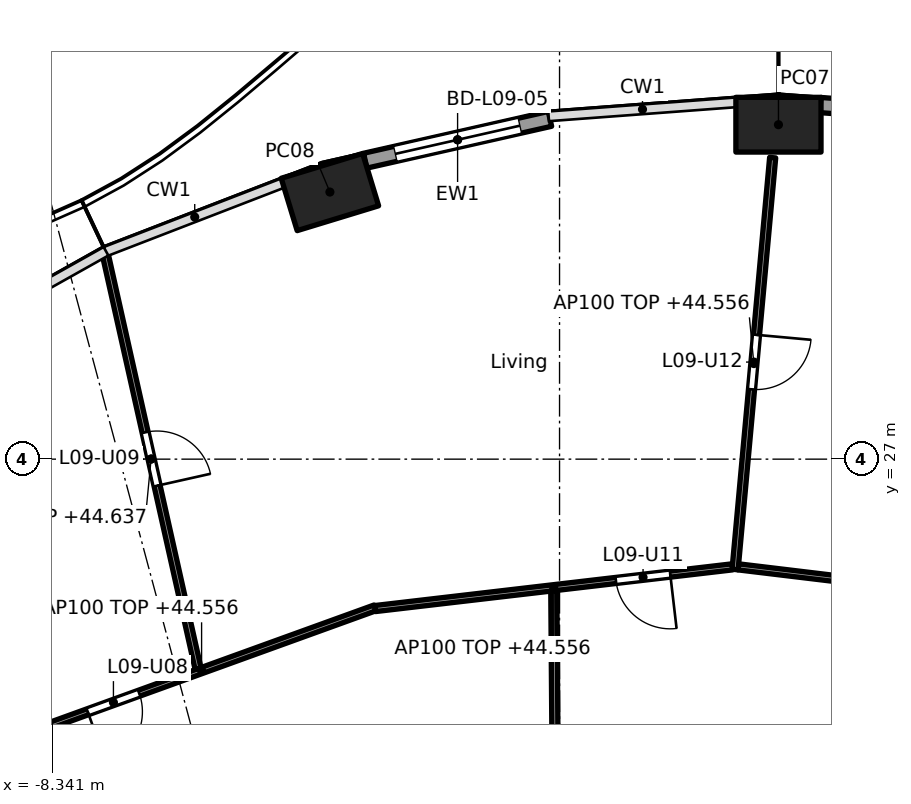
"""IFC4 building model, lengths in metres.
Left out: names, types, materials, properties, quantities, classifications, styles, units other than length and angle.
Written with IfcOpenShell. Run it as: python <this file> out.ifc"""

import sys

from ifc_helpers import new_model, si_unit, direction, frame, frame_2d, origin, origin_2d, place, context, subcontext, project, spatial, rectangle, hollow_rectangle, extrude, element, fill, save


model = new_model("IFC4")
c1 = context("Model", 3, precision=1e-05, world=origin(), true_north=direction((0.0, 1.0)))
c2 = subcontext(c1, "Body", "Model", "MODEL_VIEW")
j1 = project(units=[si_unit("LENGTHUNIT", "METRE"), si_unit("PLANEANGLEUNIT", "RADIAN")], contexts=[c1])
p1 = place(None, origin())
s1 = spatial("IfcSite", under=j1, at=p1, CompositionType="ELEMENT")
p2 = place(p1, origin())
s2 = spatial("IfcBuilding", under=s1, at=p2, CompositionType="ELEMENT")
p3 = place(p2, frame((0.0, 0.0, 41.8)))
s3 = spatial("IfcBuildingStorey", under=s2, at=p3, CompositionType="ELEMENT", Elevation=41.8)
for number, where, z_axis, x_axis in (
    (1, (3.6, 32.5, 0.0), (0.0, 0.0, 1.0), (-1.0, 0.0, 0.0)),
    (2, (-3.776, 31.393, 0.0), (0.0, 0.0, 1.0), (-0.957, -0.292, 0.0)),
):
    element("IfcColumn", number, at=place(p3, frame(where, z_axis=z_axis, x_axis=x_axis)), inside=s3, PredefinedType="COLUMN", context=c2, shape_type="SweptSolid", body=[
        extrude(hollow_rectangle(XDim=1.4, YDim=0.9, WallThickness=0.05, at=origin_2d()), origin(), (0.0, 0.0, 1.0), 3.7),
    ])
p4 = place(p3, frame((4.289, 32.823, 0.0), z_axis=(0.0, 0.0, 1.0), x_axis=(0.997230834878, -0.074368420505, 0.0)))
e3 = element("IfcWall", 3, at=p4, inside=s3, PredefinedType="SOLIDWALL", context=c2, shape_type="SweptSolid", body=[
    extrude(rectangle(XDim=3.096, YDim=0.25, at=frame_2d((1.548, 0.0))), origin(), (0.0, 0.0, 1.0), 3.44),
])
p5 = place(p4, frame((0.498, 0.0, 0.0)))
e4 = element("IfcOpeningElement", 4, at=p5, cuts=e3, PredefinedType="OPENING", context=c2, shape_type="SweptSolid", body=[
    extrude(rectangle(XDim=2.1, YDim=2.4, at=frame_2d((1.05, 1.2))), frame((0.0, 0.135, 0.0), z_axis=(0.0, -1.0, 0.0), x_axis=(1.0, 0.0, 0.0)), (0.0, 0.0, 1.0), 0.27),
])
p6 = place(p3, frame((-3.195, 31.908, 0.0), z_axis=(0.0, 0.0, 1.0), x_axis=(0.975331134677, 0.220746863466, 0.0)))
e5 = element("IfcWall", 5, at=p6, inside=s3, PredefinedType="SOLIDWALL", context=c2, shape_type="SweptSolid", body=[
    extrude(rectangle(XDim=3.115, YDim=0.25, at=frame_2d((1.557, 0.0))), origin(), (0.0, 0.0, 1.0), 3.44),
])
p7 = place(p6, frame((0.507, 0.0, 0.0)))
e6 = element("IfcOpeningElement", 6, at=p7, cuts=e5, PredefinedType="OPENING", context=c2, shape_type="SweptSolid", body=[
    extrude(rectangle(XDim=2.1, YDim=2.4, at=frame_2d((1.05, 1.2))), frame((0.0, 0.135, 0.0), z_axis=(0.0, -1.0, 0.0), x_axis=(1.0, 0.0, 0.0)), (0.0, 0.0, 1.0), 0.27),
])
p8 = place(p3, frame((8.907, 24.51, 0.0), z_axis=(0.0, 0.0, 1.0), x_axis=(-0.992836798252, 0.119478416615, 0.0)))
e7 = element("IfcWall", 7, at=p8, inside=s3, PredefinedType="PARTITIONING", context=c2, shape_type="SweptSolid", body=[
    extrude(rectangle(XDim=6.01, YDim=0.1, at=frame_2d((3.005, 0.0))), origin(), (0.0, 0.0, 1.0), 2.756),
])
p9 = place(p3, frame((2.887, 25.185, 0.0), z_axis=(0.0, 0.0, 1.0), x_axis=(0.090885272046, 0.995861369531, 0.0)))
e8 = element("IfcWall", 8, at=p9, inside=s3, PredefinedType="PARTITIONING", context=c2, shape_type="SweptSolid", body=[
    extrude(rectangle(XDim=6.802, YDim=0.1, at=frame_2d((3.401, 0.0))), origin(), (0.0, 0.0, 1.0), 2.756),
])
p10 = place(p9, frame((2.976, 0.0, 0.0)))
e9 = element("IfcOpeningElement", 9, at=p10, cuts=e8, PredefinedType="OPENING", context=c2, shape_type="SweptSolid", body=[
    extrude(rectangle(XDim=0.9, YDim=2.1, at=frame_2d((0.45, 1.05))), frame((0.0, 0.06, 0.0), z_axis=(0.0, -1.0, 0.0), x_axis=(1.0, 0.0, 0.0)), (0.0, 0.0, 1.0), 0.12),
])
p11 = place(p3, frame((2.842, 25.229, 0.0), z_axis=(0.0, 0.0, 1.0), x_axis=(-0.993255612046, -0.115945198862, 0.0)))
e10 = element("IfcWall", 10, at=p11, inside=s3, PredefinedType="PARTITIONING", context=c2, shape_type="SweptSolid", body=[
    extrude(rectangle(XDim=5.913, YDim=0.1, at=frame_2d((2.956, 0.0))), origin(), (0.0, 0.0, 1.0), 2.756),
])
p12 = place(p11, frame((1.028, 0.0, 0.0)))
e11 = element("IfcOpeningElement", 11, at=p12, cuts=e10, PredefinedType="OPENING", context=c2, shape_type="SweptSolid", body=[
    extrude(rectangle(XDim=0.9, YDim=2.1, at=frame_2d((0.45, 1.05))), frame((0.0, 0.06, 0.0), z_axis=(0.0, -1.0, 0.0), x_axis=(1.0, 0.0, 0.0)), (0.0, 0.0, 1.0), 0.12),
])
p13 = place(p3, frame((-0.042, 17.98, 0.0), z_axis=(0.0, 0.0, 1.0), x_axis=(-0.007692080119, 0.999970415514, 0.0)))
e12 = element("IfcWall", 12, at=p13, inside=s3, PredefinedType="PARTITIONING", context=c2, shape_type="SweptSolid", body=[
    extrude(rectangle(XDim=6.856, YDim=0.1, at=frame_2d((3.428, 0.0))), origin(), (0.0, 0.0, 1.0), 3.44),
])
p14 = place(p3, frame((-3.034, 24.554, 0.0), z_axis=(0.0, 0.0, 1.0), x_axis=(-0.940401691072, -0.340065669288, 0.0)))
e13 = element("IfcWall", 13, at=p14, inside=s3, PredefinedType="PARTITIONING", context=c2, shape_type="SweptSolid", body=[
    extrude(rectangle(XDim=6.067, YDim=0.1, at=frame_2d((3.034, 0.0))), origin(), (0.0, 0.0, 1.0), 2.756),
])
p15 = place(p14, frame((4.125, 0.0, 0.0)))
e14 = element("IfcOpeningElement", 14, at=p15, cuts=e13, PredefinedType="OPENING", context=c2, shape_type="SweptSolid", body=[
    extrude(rectangle(XDim=0.9, YDim=2.1, at=frame_2d((0.45, 1.05))), frame((0.0, 0.06, 0.0), z_axis=(0.0, -1.0, 0.0), x_axis=(1.0, 0.0, 0.0)), (0.0, 0.0, 1.0), 0.12),
])
p16 = place(p3, frame((-5.945, 23.555, 0.0), z_axis=(0.0, 0.0, 1.0), x_axis=(-0.218598565433, 0.975814873421, 0.0)))
e15 = element("IfcWall", 15, at=p16, inside=s3, PredefinedType="PARTITIONING", context=c2, shape_type="SweptSolid", body=[
    extrude(rectangle(XDim=7.065, YDim=0.1, at=frame_2d((3.533, 0.0))), origin(), (0.0, 0.0, 1.0), 2.837),
])
p17 = place(p16, frame((3.083, 0.0, 0.0)))
e16 = element("IfcOpeningElement", 16, at=p17, cuts=e15, PredefinedType="OPENING", context=c2, shape_type="SweptSolid", body=[
    extrude(rectangle(XDim=0.9, YDim=2.1, at=frame_2d((0.45, 1.05))), frame((0.0, 0.06, 0.0), z_axis=(0.0, -1.0, 0.0), x_axis=(1.0, 0.0, 0.0)), (0.0, 0.0, 1.0), 0.12),
])
p18 = place(p7, origin())
e17 = element("IfcDoor", 17, at=p18, inside=s3, OperationType="SLIDING_TO_LEFT", PredefinedType="DOOR", context=c2, shape_type="SweptSolid", body=[
    extrude(rectangle(XDim=2.1, YDim=2.4, at=frame_2d((1.05, 1.2))), frame((0.0, 0.025, 0.0), z_axis=(0.0, -1.0, 0.0), x_axis=(1.0, 0.0, 0.0)), (0.0, 0.0, 1.0), 0.05),
])
fill(e6, e17)
p19 = place(p15, origin())
e18 = element("IfcDoor", 18, at=p19, inside=s3, OperationType="SINGLE_SWING_RIGHT", PredefinedType="DOOR", context=c2, shape_type="SweptSolid", body=[
    extrude(rectangle(XDim=0.9, YDim=2.1, at=frame_2d((0.45, 1.05))), frame((0.0, 0.025, 0.0), z_axis=(0.0, -1.0, 0.0), x_axis=(1.0, 0.0, 0.0)), (0.0, 0.0, 1.0), 0.05),
])
fill(e14, e18)
p20 = place(p17, frame((0.9, 0.0, 0.0), x_axis=(-1.0, 0.0, 0.0)))
e19 = element("IfcDoor", 19, at=p20, inside=s3, OperationType="SINGLE_SWING_RIGHT", PredefinedType="DOOR", context=c2, shape_type="SweptSolid", body=[
    extrude(rectangle(XDim=0.9, YDim=2.1, at=frame_2d((0.45, 1.05))), frame((0.0, 0.025, 0.0), z_axis=(0.0, -1.0, 0.0), x_axis=(1.0, 0.0, 0.0)), (0.0, 0.0, 1.0), 0.05),
])
fill(e16, e19)
p21 = place(p12, origin())
e20 = element("IfcDoor", 20, at=p21, inside=s3, OperationType="SINGLE_SWING_LEFT", PredefinedType="DOOR", context=c2, shape_type="SweptSolid", body=[
    extrude(rectangle(XDim=0.9, YDim=2.1, at=frame_2d((0.45, 1.05))), frame((0.0, 0.025, 0.0), z_axis=(0.0, -1.0, 0.0), x_axis=(1.0, 0.0, 0.0)), (0.0, 0.0, 1.0), 0.05),
])
fill(e11, e20)
p22 = place(p10, frame((0.9, 0.0, 0.0), x_axis=(-1.0, 0.0, 0.0)))
e21 = element("IfcDoor", 21, at=p22, inside=s3, OperationType="SINGLE_SWING_LEFT", PredefinedType="DOOR", context=c2, shape_type="SweptSolid", body=[
    extrude(rectangle(XDim=0.9, YDim=2.1, at=frame_2d((0.45, 1.05))), frame((0.0, 0.025, 0.0), z_axis=(0.0, -1.0, 0.0), x_axis=(1.0, 0.0, 0.0)), (0.0, 0.0, 1.0), 0.05),
])
fill(e9, e21)
save(model, sys.argv[1])
